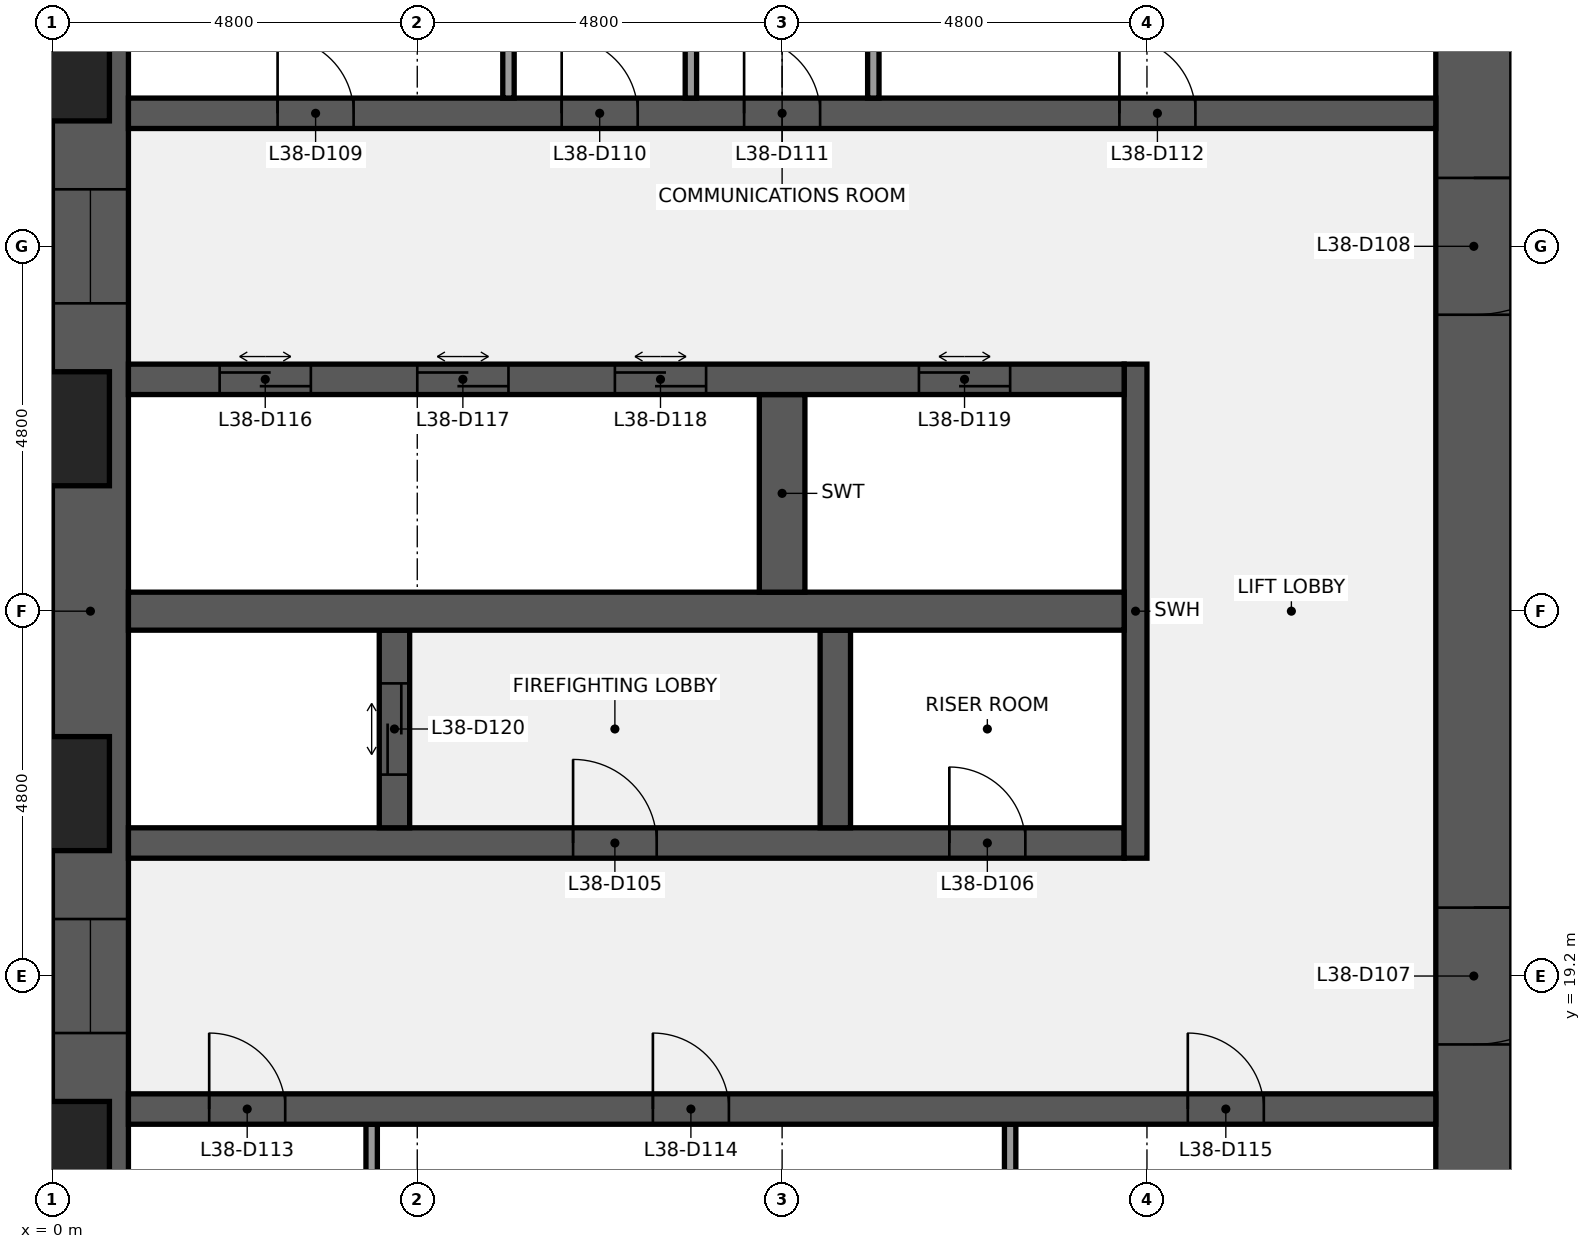
"""IFC4 building model, lengths in metres.
Left out: names, types, materials, properties, quantities, classifications, styles, units other than length and angle.
Written with IfcOpenShell. Run it as: python <this file> out.ifc"""

import sys

from ifc_helpers import new_model, si_unit, direction, frame, frame_2d, origin, place, context, subcontext, project, spatial, rectangle, extrude, element, fill, save


model = new_model("IFC4")
c1 = context("Model", 3, precision=1e-05, world=origin(), true_north=direction((0.0, 1.0)))
c2 = subcontext(c1, "Body", "Model", "MODEL_VIEW")
j1 = project(units=[si_unit("LENGTHUNIT", "METRE"), si_unit("PLANEANGLEUNIT", "RADIAN")], contexts=[c1])
p1 = place(None, origin())
s1 = spatial("IfcSite", under=j1, at=p1, CompositionType="ELEMENT")
p2 = place(p1, origin())
s2 = spatial("IfcBuilding", under=s1, at=p2, CompositionType="ELEMENT")
p3 = place(p2, frame((0.0, 0.0, 172.1)))
s3 = spatial("IfcBuildingStorey", under=s2, at=p3, CompositionType="ELEMENT", Elevation=172.1)
p4 = place(p3, frame((0.5, 9.6, 0.0), z_axis=(0.0, 0.0, 1.0), x_axis=(0.0, 1.0, 0.0)))
e1 = element("IfcWall", 1, at=p4, inside=s3, PredefinedType="SHEAR", context=c2, shape_type="SweptSolid", body=[
    extrude(rectangle(XDim=28.8, YDim=1.0, at=frame_2d((14.4, 0.0))), origin(), (0.0, 0.0, 1.0), 3.7),
])
p5 = place(p4, frame((8.85, 0.0, 0.9)))
e2 = element("IfcOpeningElement", 2, at=p5, cuts=e1, PredefinedType="OPENING", context=c2, shape_type="SweptSolid", body=[
    extrude(rectangle(XDim=1.5, YDim=1.5, at=frame_2d((0.75, 0.75))), frame((0.0, 0.51, 0.0), z_axis=(0.0, -1.0, 0.0), x_axis=(1.0, 0.0, 0.0)), (0.0, 0.0, 1.0), 1.02),
])
p6 = place(p4, frame((18.45, 0.0, 0.9)))
e3 = element("IfcOpeningElement", 3, at=p6, cuts=e1, PredefinedType="OPENING", context=c2, shape_type="SweptSolid", body=[
    extrude(rectangle(XDim=1.5, YDim=1.5, at=frame_2d((0.75, 0.75))), frame((0.0, 0.51, 0.0), z_axis=(0.0, -1.0, 0.0), x_axis=(1.0, 0.0, 0.0)), (0.0, 0.0, 1.0), 1.02),
])
p7 = place(p3, frame((18.7, 38.4, 0.0), z_axis=(0.0, 0.0, 1.0), x_axis=(0.0, -1.0, 0.0)))
e4 = element("IfcWall", 4, at=p7, inside=s3, PredefinedType="SHEAR", context=c2, shape_type="SweptSolid", body=[
    extrude(rectangle(XDim=28.8, YDim=1.0, at=frame_2d((14.4, 0.0))), origin(), (0.0, 0.0, 1.0), 3.7),
])
p8 = place(p7, frame((18.3, 0.0, 0.0)))
e5 = element("IfcOpeningElement", 5, at=p8, cuts=e4, PredefinedType="OPENING", context=c2, shape_type="SweptSolid", body=[
    extrude(rectangle(XDim=1.8, YDim=2.1, at=frame_2d((0.9, 1.05))), frame((0.0, 0.51, 0.0), z_axis=(0.0, -1.0, 0.0), x_axis=(1.0, 0.0, 0.0)), (0.0, 0.0, 1.0), 1.02),
])
p9 = place(p7, frame((8.7, 0.0, 0.0)))
e6 = element("IfcOpeningElement", 6, at=p9, cuts=e4, PredefinedType="OPENING", context=c2, shape_type="SweptSolid", body=[
    extrude(rectangle(XDim=1.8, YDim=2.1, at=frame_2d((0.9, 1.05))), frame((0.0, 0.51, 0.0), z_axis=(0.0, -1.0, 0.0), x_axis=(1.0, 0.0, 0.0)), (0.0, 0.0, 1.0), 1.02),
])
for number, where, z_axis, x_axis in (
    (7, (4.2, 14.65, 0.0), (0.0, 0.0, 1.0), (0.0, 1.0, 0.0)),
    (8, (12.6, 14.65, 0.0), (0.0, 0.0, 1.0), (0.0, 1.0, 0.0)),
):
    element("IfcWall", number, at=place(p3, frame(where, z_axis=z_axis, x_axis=x_axis)), inside=s3, PredefinedType="PARTITIONING", context=c2, shape_type="SweptSolid", body=[
        extrude(rectangle(XDim=2.6, YDim=0.15, at=frame_2d((1.3, 0.0))), origin(), (0.0, 0.0, 1.0), 3.7),
    ])
p10 = place(p3, frame((1.0, 17.45, 0.0), z_axis=(0.0, 0.0, 1.0), x_axis=(1.0, 0.0, 0.0)))
e9 = element("IfcWall", 9, at=p10, inside=s3, PredefinedType="SHEAR", context=c2, shape_type="SweptSolid", body=[
    extrude(rectangle(XDim=17.2, YDim=0.4, at=frame_2d((8.6, 0.0))), origin(), (0.0, 0.0, 1.0), 3.7),
])
p11 = place(p10, frame((1.062, 0.0, 0.0)))
e10 = element("IfcOpeningElement", 10, at=p11, cuts=e9, PredefinedType="OPENING", context=c2, shape_type="SweptSolid", body=[
    extrude(rectangle(XDim=1.0, YDim=2.1, at=frame_2d((0.5, 1.05))), frame((0.0, 0.21, 0.0), z_axis=(0.0, -1.0, 0.0), x_axis=(1.0, 0.0, 0.0)), (0.0, 0.0, 1.0), 0.42),
])
p12 = place(p10, frame((6.9, 0.0, 0.0)))
e11 = element("IfcOpeningElement", 11, at=p12, cuts=e9, PredefinedType="OPENING", context=c2, shape_type="SweptSolid", body=[
    extrude(rectangle(XDim=1.0, YDim=2.1, at=frame_2d((0.5, 1.05))), frame((0.0, 0.21, 0.0), z_axis=(0.0, -1.0, 0.0), x_axis=(1.0, 0.0, 0.0)), (0.0, 0.0, 1.0), 0.42),
])
p13 = place(p10, frame((13.938, 0.0, 0.0)))
e12 = element("IfcOpeningElement", 12, at=p13, cuts=e9, PredefinedType="OPENING", context=c2, shape_type="SweptSolid", body=[
    extrude(rectangle(XDim=1.0, YDim=2.1, at=frame_2d((0.5, 1.05))), frame((0.0, 0.21, 0.0), z_axis=(0.0, -1.0, 0.0), x_axis=(1.0, 0.0, 0.0)), (0.0, 0.0, 1.0), 0.42),
])
p14 = place(p3, frame((1.0, 20.95, 0.0), z_axis=(0.0, 0.0, 1.0), x_axis=(1.0, 0.0, 0.0)))
e13 = element("IfcWall", 13, at=p14, inside=s3, PredefinedType="SHEAR", context=c2, shape_type="SweptSolid", body=[
    extrude(rectangle(XDim=13.1, YDim=0.4, at=frame_2d((6.55, 0.0))), origin(), (0.0, 0.0, 1.0), 3.7),
])
p15 = place(p14, frame((5.85, 0.0, 0.0)))
e14 = element("IfcOpeningElement", 14, at=p15, cuts=e13, PredefinedType="OPENING", context=c2, shape_type="SweptSolid", body=[
    extrude(rectangle(XDim=1.1, YDim=2.1, at=frame_2d((0.55, 1.05))), frame((0.0, 0.21, 0.0), z_axis=(0.0, -1.0, 0.0), x_axis=(1.0, 0.0, 0.0)), (0.0, 0.0, 1.0), 0.42),
])
p16 = place(p14, frame((10.8, 0.0, 0.0)))
e15 = element("IfcOpeningElement", 15, at=p16, cuts=e13, PredefinedType="OPENING", context=c2, shape_type="SweptSolid", body=[
    extrude(rectangle(XDim=1.0, YDim=2.1, at=frame_2d((0.5, 1.05))), frame((0.0, 0.21, 0.0), z_axis=(0.0, -1.0, 0.0), x_axis=(1.0, 0.0, 0.0)), (0.0, 0.0, 1.0), 0.42),
])
p17 = place(p3, frame((14.25, 20.75, 0.0), z_axis=(0.0, 0.0, 1.0), x_axis=(0.0, 1.0, 0.0)))
e16 = element("IfcWall", 16, at=p17, inside=s3, PredefinedType="SHEAR", context=c2, shape_type="SweptSolid", body=[
    extrude(rectangle(XDim=6.5, YDim=0.3, at=frame_2d((3.25, 0.0))), origin(), (0.0, 0.0, 1.0), 3.7),
])
p18 = place(p3, frame((4.5, 21.15, 0.0), z_axis=(0.0, 0.0, 1.0), x_axis=(0.0, 1.0, 0.0)))
e17 = element("IfcWall", 17, at=p18, inside=s3, PredefinedType="SHEAR", context=c2, shape_type="SweptSolid", body=[
    extrude(rectangle(XDim=2.6, YDim=0.4, at=frame_2d((1.3, 0.0))), origin(), (0.0, 0.0, 1.0), 3.7),
])
p19 = place(p18, frame((0.7, 0.0, 0.0)))
e18 = element("IfcOpeningElement", 18, at=p19, cuts=e17, PredefinedType="OPENING", context=c2, shape_type="SweptSolid", body=[
    extrude(rectangle(XDim=1.2, YDim=2.1, at=frame_2d((0.6, 1.05))), frame((0.0, 0.21, 0.0), z_axis=(0.0, -1.0, 0.0), x_axis=(1.0, 0.0, 0.0)), (0.0, 0.0, 1.0), 0.42),
])
p20 = place(p3, frame((10.3, 21.15, 0.0), z_axis=(0.0, 0.0, 1.0), x_axis=(0.0, 1.0, 0.0)))
e19 = element("IfcWall", 19, at=p20, inside=s3, PredefinedType="SHEAR", context=c2, shape_type="SweptSolid", body=[
    extrude(rectangle(XDim=2.6, YDim=0.4, at=frame_2d((1.3, 0.0))), origin(), (0.0, 0.0, 1.0), 3.7),
])
p21 = place(p3, frame((1.0, 24.0, 0.0), z_axis=(0.0, 0.0, 1.0), x_axis=(1.0, 0.0, 0.0)))
e20 = element("IfcWall", 20, at=p21, inside=s3, PredefinedType="SHEAR", context=c2, shape_type="SweptSolid", body=[
    extrude(rectangle(XDim=13.1, YDim=0.5, at=frame_2d((6.55, 0.0))), origin(), (0.0, 0.0, 1.0), 3.7),
])
p22 = place(p3, frame((9.6, 24.25, 0.0), z_axis=(0.0, 0.0, 1.0), x_axis=(0.0, 1.0, 0.0)))
e21 = element("IfcWall", 21, at=p22, inside=s3, PredefinedType="SHEAR", context=c2, shape_type="SweptSolid", body=[
    extrude(rectangle(XDim=2.6, YDim=0.6, at=frame_2d((1.3, 0.0))), origin(), (0.0, 0.0, 1.0), 3.7),
])
p23 = place(p3, frame((1.0, 27.05, 0.0), z_axis=(0.0, 0.0, 1.0), x_axis=(1.0, 0.0, 0.0)))
e22 = element("IfcWall", 22, at=p23, inside=s3, PredefinedType="SHEAR", context=c2, shape_type="SweptSolid", body=[
    extrude(rectangle(XDim=13.1, YDim=0.4, at=frame_2d((6.55, 0.0))), origin(), (0.0, 0.0, 1.0), 3.7),
])
p24 = place(p23, frame((1.2, 0.0, 0.0)))
e23 = element("IfcOpeningElement", 23, at=p24, cuts=e22, PredefinedType="OPENING", context=c2, shape_type="SweptSolid", body=[
    extrude(rectangle(XDim=1.2, YDim=2.1, at=frame_2d((0.6, 1.05))), frame((0.0, 0.21, 0.0), z_axis=(0.0, -1.0, 0.0), x_axis=(1.0, 0.0, 0.0)), (0.0, 0.0, 1.0), 0.42),
])
p25 = place(p23, frame((3.8, 0.0, 0.0)))
e24 = element("IfcOpeningElement", 24, at=p25, cuts=e22, PredefinedType="OPENING", context=c2, shape_type="SweptSolid", body=[
    extrude(rectangle(XDim=1.2, YDim=2.1, at=frame_2d((0.6, 1.05))), frame((0.0, 0.21, 0.0), z_axis=(0.0, -1.0, 0.0), x_axis=(1.0, 0.0, 0.0)), (0.0, 0.0, 1.0), 0.42),
])
p26 = place(p23, frame((6.4, 0.0, 0.0)))
e25 = element("IfcOpeningElement", 25, at=p26, cuts=e22, PredefinedType="OPENING", context=c2, shape_type="SweptSolid", body=[
    extrude(rectangle(XDim=1.2, YDim=2.1, at=frame_2d((0.6, 1.05))), frame((0.0, 0.21, 0.0), z_axis=(0.0, -1.0, 0.0), x_axis=(1.0, 0.0, 0.0)), (0.0, 0.0, 1.0), 0.42),
])
p27 = place(p23, frame((10.4, 0.0, 0.0)))
e26 = element("IfcOpeningElement", 26, at=p27, cuts=e22, PredefinedType="OPENING", context=c2, shape_type="SweptSolid", body=[
    extrude(rectangle(XDim=1.2, YDim=2.1, at=frame_2d((0.6, 1.05))), frame((0.0, 0.21, 0.0), z_axis=(0.0, -1.0, 0.0), x_axis=(1.0, 0.0, 0.0)), (0.0, 0.0, 1.0), 0.42),
])
p28 = place(p3, frame((1.0, 30.55, 0.0), z_axis=(0.0, 0.0, 1.0), x_axis=(1.0, 0.0, 0.0)))
e27 = element("IfcWall", 27, at=p28, inside=s3, PredefinedType="SHEAR", context=c2, shape_type="SweptSolid", body=[
    extrude(rectangle(XDim=17.2, YDim=0.4, at=frame_2d((8.6, 0.0))), origin(), (0.0, 0.0, 1.0), 3.7),
])
p29 = place(p28, frame((1.962, 0.0, 0.0)))
e28 = element("IfcOpeningElement", 28, at=p29, cuts=e27, PredefinedType="OPENING", context=c2, shape_type="SweptSolid", body=[
    extrude(rectangle(XDim=1.0, YDim=2.1, at=frame_2d((0.5, 1.05))), frame((0.0, 0.21, 0.0), z_axis=(0.0, -1.0, 0.0), x_axis=(1.0, 0.0, 0.0)), (0.0, 0.0, 1.0), 0.42),
])
p30 = place(p28, frame((5.7, 0.0, 0.0)))
e29 = element("IfcOpeningElement", 29, at=p30, cuts=e27, PredefinedType="OPENING", context=c2, shape_type="SweptSolid", body=[
    extrude(rectangle(XDim=1.0, YDim=2.1, at=frame_2d((0.5, 1.05))), frame((0.0, 0.21, 0.0), z_axis=(0.0, -1.0, 0.0), x_axis=(1.0, 0.0, 0.0)), (0.0, 0.0, 1.0), 0.42),
])
p31 = place(p28, frame((8.1, 0.0, 0.0)))
e30 = element("IfcOpeningElement", 30, at=p31, cuts=e27, PredefinedType="OPENING", context=c2, shape_type="SweptSolid", body=[
    extrude(rectangle(XDim=1.0, YDim=2.1, at=frame_2d((0.5, 1.05))), frame((0.0, 0.21, 0.0), z_axis=(0.0, -1.0, 0.0), x_axis=(1.0, 0.0, 0.0)), (0.0, 0.0, 1.0), 0.42),
])
p32 = place(p28, frame((13.038, 0.0, 0.0)))
e31 = element("IfcOpeningElement", 31, at=p32, cuts=e27, PredefinedType="OPENING", context=c2, shape_type="SweptSolid", body=[
    extrude(rectangle(XDim=1.0, YDim=2.1, at=frame_2d((0.5, 1.05))), frame((0.0, 0.21, 0.0), z_axis=(0.0, -1.0, 0.0), x_axis=(1.0, 0.0, 0.0)), (0.0, 0.0, 1.0), 0.42),
])
for number, where, z_axis, x_axis in (
    (32, (6.0, 30.75, 0.0), (0.0, 0.0, 1.0), (0.0, 1.0, 0.0)),
    (33, (8.4, 30.75, 0.0), (0.0, 0.0, 1.0), (0.0, 1.0, 0.0)),
    (34, (10.8, 30.75, 0.0), (0.0, 0.0, 1.0), (0.0, 1.0, 0.0)),
):
    element("IfcWall", number, at=place(p3, frame(where, z_axis=z_axis, x_axis=x_axis)), inside=s3, PredefinedType="PARTITIONING", context=c2, shape_type="SweptSolid", body=[
        extrude(rectangle(XDim=2.6, YDim=0.15, at=frame_2d((1.3, 0.0))), origin(), (0.0, 0.0, 1.0), 3.7),
    ])
p33 = place(p15, origin())
e35 = element("IfcDoor", 35, at=p33, inside=s3, OperationType="SINGLE_SWING_LEFT", PredefinedType="DOOR", context=c2, shape_type="SweptSolid", body=[
    extrude(rectangle(XDim=1.1, YDim=2.1, at=frame_2d((0.55, 1.05))), frame((0.0, 0.025, 0.0), z_axis=(0.0, -1.0, 0.0), x_axis=(1.0, 0.0, 0.0)), (0.0, 0.0, 1.0), 0.05),
])
fill(e14, e35)
p34 = place(p16, origin())
e36 = element("IfcDoor", 36, at=p34, inside=s3, OperationType="SINGLE_SWING_LEFT", PredefinedType="DOOR", context=c2, shape_type="SweptSolid", body=[
    extrude(rectangle(XDim=1.0, YDim=2.1, at=frame_2d((0.5, 1.05))), frame((0.0, 0.025, 0.0), z_axis=(0.0, -1.0, 0.0), x_axis=(1.0, 0.0, 0.0)), (0.0, 0.0, 1.0), 0.05),
])
fill(e15, e36)
p35 = place(p8, origin())
e37 = element("IfcDoor", 37, at=p35, inside=s3, OperationType="DOUBLE_DOOR_SINGLE_SWING", PredefinedType="DOOR", context=c2, shape_type="SweptSolid", body=[
    extrude(rectangle(XDim=1.8, YDim=2.1, at=frame_2d((0.9, 1.05))), frame((0.0, 0.025, 0.0), z_axis=(0.0, -1.0, 0.0), x_axis=(1.0, 0.0, 0.0)), (0.0, 0.0, 1.0), 0.05),
])
fill(e5, e37)
p36 = place(p9, origin())
e38 = element("IfcDoor", 38, at=p36, inside=s3, OperationType="DOUBLE_DOOR_SINGLE_SWING", PredefinedType="DOOR", context=c2, shape_type="SweptSolid", body=[
    extrude(rectangle(XDim=1.8, YDim=2.1, at=frame_2d((0.9, 1.05))), frame((0.0, 0.025, 0.0), z_axis=(0.0, -1.0, 0.0), x_axis=(1.0, 0.0, 0.0)), (0.0, 0.0, 1.0), 0.05),
])
fill(e6, e38)
p37 = place(p29, origin())
e39 = element("IfcDoor", 39, at=p37, inside=s3, OperationType="SINGLE_SWING_LEFT", PredefinedType="DOOR", context=c2, shape_type="SweptSolid", body=[
    extrude(rectangle(XDim=1.0, YDim=2.1, at=frame_2d((0.5, 1.05))), frame((0.0, 0.025, 0.0), z_axis=(0.0, -1.0, 0.0), x_axis=(1.0, 0.0, 0.0)), (0.0, 0.0, 1.0), 0.05),
])
fill(e28, e39)
p38 = place(p30, origin())
e40 = element("IfcDoor", 40, at=p38, inside=s3, OperationType="SINGLE_SWING_LEFT", PredefinedType="DOOR", context=c2, shape_type="SweptSolid", body=[
    extrude(rectangle(XDim=1.0, YDim=2.1, at=frame_2d((0.5, 1.05))), frame((0.0, 0.025, 0.0), z_axis=(0.0, -1.0, 0.0), x_axis=(1.0, 0.0, 0.0)), (0.0, 0.0, 1.0), 0.05),
])
fill(e29, e40)
p39 = place(p31, origin())
e41 = element("IfcDoor", 41, at=p39, inside=s3, OperationType="SINGLE_SWING_LEFT", PredefinedType="DOOR", context=c2, shape_type="SweptSolid", body=[
    extrude(rectangle(XDim=1.0, YDim=2.1, at=frame_2d((0.5, 1.05))), frame((0.0, 0.025, 0.0), z_axis=(0.0, -1.0, 0.0), x_axis=(1.0, 0.0, 0.0)), (0.0, 0.0, 1.0), 0.05),
])
fill(e30, e41)
p40 = place(p32, origin())
e42 = element("IfcDoor", 42, at=p40, inside=s3, OperationType="SINGLE_SWING_LEFT", PredefinedType="DOOR", context=c2, shape_type="SweptSolid", body=[
    extrude(rectangle(XDim=1.0, YDim=2.1, at=frame_2d((0.5, 1.05))), frame((0.0, 0.025, 0.0), z_axis=(0.0, -1.0, 0.0), x_axis=(1.0, 0.0, 0.0)), (0.0, 0.0, 1.0), 0.05),
])
fill(e31, e42)
p41 = place(p11, origin())
e43 = element("IfcDoor", 43, at=p41, inside=s3, OperationType="SINGLE_SWING_LEFT", PredefinedType="DOOR", context=c2, shape_type="SweptSolid", body=[
    extrude(rectangle(XDim=1.0, YDim=2.1, at=frame_2d((0.5, 1.05))), frame((0.0, 0.025, 0.0), z_axis=(0.0, -1.0, 0.0), x_axis=(1.0, 0.0, 0.0)), (0.0, 0.0, 1.0), 0.05),
])
fill(e10, e43)
p42 = place(p12, origin())
e44 = element("IfcDoor", 44, at=p42, inside=s3, OperationType="SINGLE_SWING_LEFT", PredefinedType="DOOR", context=c2, shape_type="SweptSolid", body=[
    extrude(rectangle(XDim=1.0, YDim=2.1, at=frame_2d((0.5, 1.05))), frame((0.0, 0.025, 0.0), z_axis=(0.0, -1.0, 0.0), x_axis=(1.0, 0.0, 0.0)), (0.0, 0.0, 1.0), 0.05),
])
fill(e11, e44)
p43 = place(p13, origin())
e45 = element("IfcDoor", 45, at=p43, inside=s3, OperationType="SINGLE_SWING_LEFT", PredefinedType="DOOR", context=c2, shape_type="SweptSolid", body=[
    extrude(rectangle(XDim=1.0, YDim=2.1, at=frame_2d((0.5, 1.05))), frame((0.0, 0.025, 0.0), z_axis=(0.0, -1.0, 0.0), x_axis=(1.0, 0.0, 0.0)), (0.0, 0.0, 1.0), 0.05),
])
fill(e12, e45)
p44 = place(p24, origin())
e46 = element("IfcDoor", 46, at=p44, inside=s3, OperationType="DOUBLE_DOOR_SLIDING", PredefinedType="DOOR", context=c2, shape_type="SweptSolid", body=[
    extrude(rectangle(XDim=1.2, YDim=2.1, at=frame_2d((0.6, 1.05))), frame((0.0, 0.025, 0.0), z_axis=(0.0, -1.0, 0.0), x_axis=(1.0, 0.0, 0.0)), (0.0, 0.0, 1.0), 0.05),
])
fill(e23, e46)
p45 = place(p25, origin())
e47 = element("IfcDoor", 47, at=p45, inside=s3, OperationType="DOUBLE_DOOR_SLIDING", PredefinedType="DOOR", context=c2, shape_type="SweptSolid", body=[
    extrude(rectangle(XDim=1.2, YDim=2.1, at=frame_2d((0.6, 1.05))), frame((0.0, 0.025, 0.0), z_axis=(0.0, -1.0, 0.0), x_axis=(1.0, 0.0, 0.0)), (0.0, 0.0, 1.0), 0.05),
])
fill(e24, e47)
p46 = place(p26, origin())
e48 = element("IfcDoor", 48, at=p46, inside=s3, OperationType="DOUBLE_DOOR_SLIDING", PredefinedType="DOOR", context=c2, shape_type="SweptSolid", body=[
    extrude(rectangle(XDim=1.2, YDim=2.1, at=frame_2d((0.6, 1.05))), frame((0.0, 0.025, 0.0), z_axis=(0.0, -1.0, 0.0), x_axis=(1.0, 0.0, 0.0)), (0.0, 0.0, 1.0), 0.05),
])
fill(e25, e48)
p47 = place(p27, origin())
e49 = element("IfcDoor", 49, at=p47, inside=s3, OperationType="DOUBLE_DOOR_SLIDING", PredefinedType="DOOR", context=c2, shape_type="SweptSolid", body=[
    extrude(rectangle(XDim=1.2, YDim=2.1, at=frame_2d((0.6, 1.05))), frame((0.0, 0.025, 0.0), z_axis=(0.0, -1.0, 0.0), x_axis=(1.0, 0.0, 0.0)), (0.0, 0.0, 1.0), 0.05),
])
fill(e26, e49)
p48 = place(p19, origin())
e50 = element("IfcDoor", 50, at=p48, inside=s3, OperationType="DOUBLE_DOOR_SLIDING", PredefinedType="DOOR", context=c2, shape_type="SweptSolid", body=[
    extrude(rectangle(XDim=1.2, YDim=2.1, at=frame_2d((0.6, 1.05))), frame((0.0, 0.025, 0.0), z_axis=(0.0, -1.0, 0.0), x_axis=(1.0, 0.0, 0.0)), (0.0, 0.0, 1.0), 0.05),
])
fill(e18, e50)
p49 = place(p5, origin())
e51 = element("IfcWindow", 51, at=p49, inside=s3, PartitioningType="SINGLE_PANEL", PredefinedType="WINDOW", context=c2, shape_type="SweptSolid", body=[
    extrude(rectangle(XDim=1.5, YDim=1.5, at=frame_2d((0.75, 0.75))), frame((0.0, 0.03, 0.0), z_axis=(0.0, -1.0, 0.0), x_axis=(1.0, 0.0, 0.0)), (0.0, 0.0, 1.0), 0.06),
])
fill(e2, e51)
p50 = place(p6, origin())
e52 = element("IfcWindow", 52, at=p50, inside=s3, PartitioningType="SINGLE_PANEL", PredefinedType="WINDOW", context=c2, shape_type="SweptSolid", body=[
    extrude(rectangle(XDim=1.5, YDim=1.5, at=frame_2d((0.75, 0.75))), frame((0.0, 0.03, 0.0), z_axis=(0.0, -1.0, 0.0), x_axis=(1.0, 0.0, 0.0)), (0.0, 0.0, 1.0), 0.06),
])
fill(e3, e52)
save(model, sys.argv[1])
